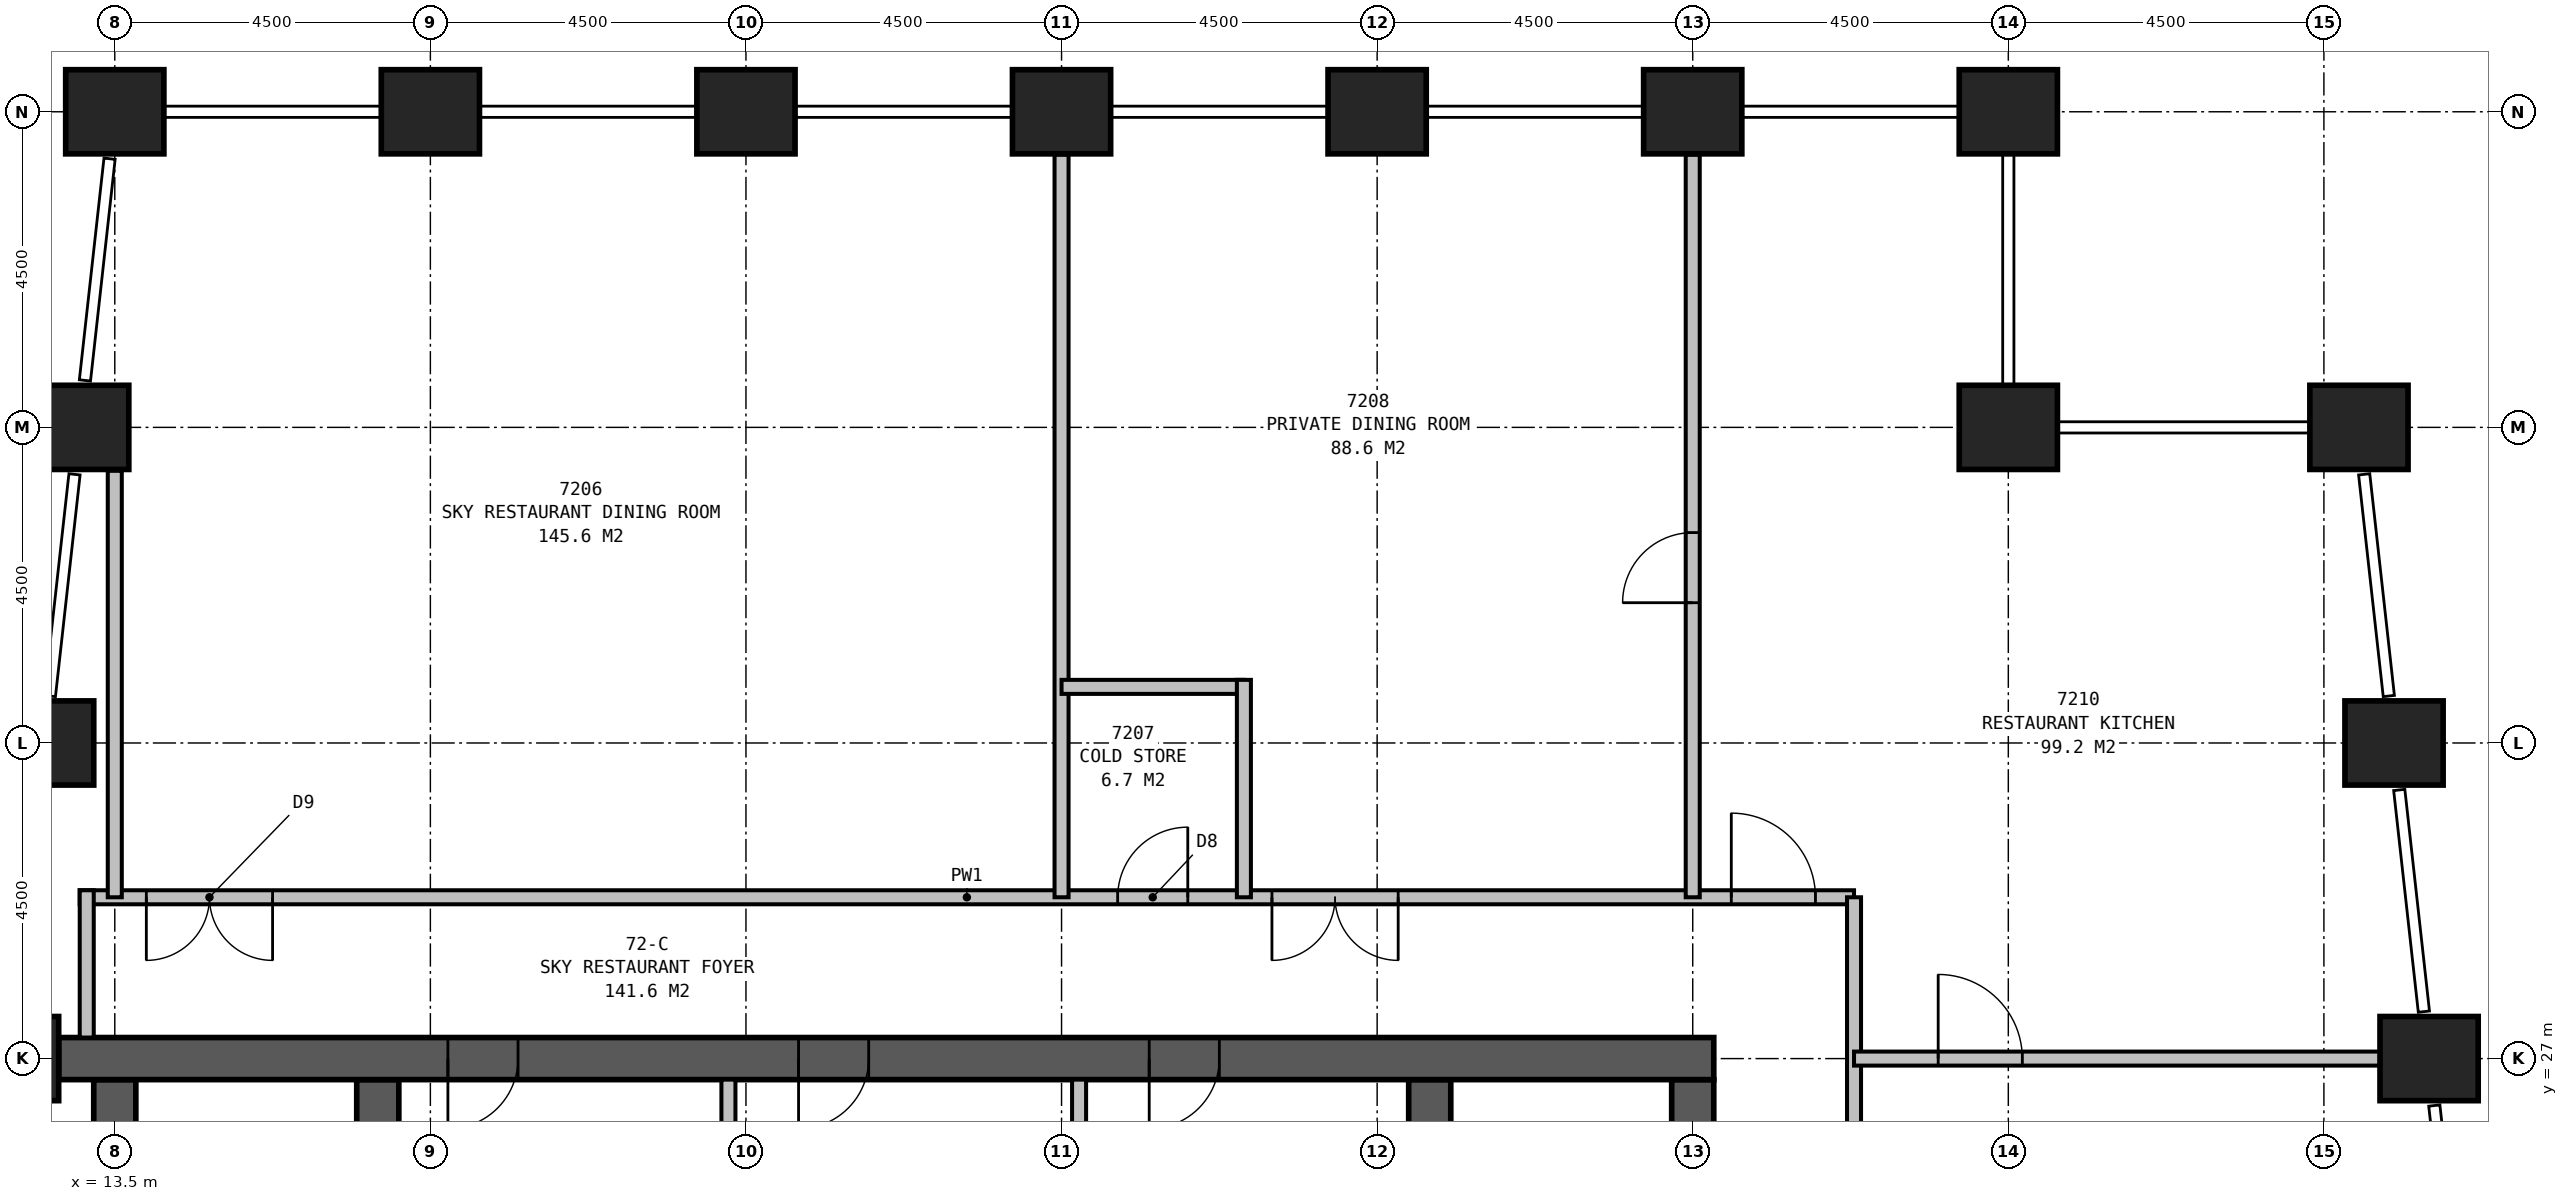
"""IFC4 building model, lengths in metres.
Left out: names, types, materials, properties, quantities, classifications, styles, units other than length and angle.
Written with IfcOpenShell. Run it as: python <this file> out.ifc"""

import sys

from ifc_helpers import new_model, si_unit, direction, frame, frame_2d, origin, origin_2d, place, context, subcontext, project, spatial, rectangle, extrude, element, fill, save


model = new_model("IFC4")
c1 = context("Model", 3, precision=1e-05, world=origin(), true_north=direction((0.0, 1.0)))
c2 = subcontext(c1, "Body", "Model", "MODEL_VIEW")
j1 = project(units=[si_unit("LENGTHUNIT", "METRE"), si_unit("PLANEANGLEUNIT", "RADIAN")], contexts=[c1])
p1 = place(None, origin())
s1 = spatial("IfcSite", under=j1, at=p1, CompositionType="ELEMENT")
p2 = place(p1, origin())
s2 = spatial("IfcBuilding", under=s1, at=p2, CompositionType="ELEMENT")
p3 = place(p2, frame((0.0, 0.0, 281.9)))
s3 = spatial("IfcBuildingStorey", under=s2, at=p3, CompositionType="ELEMENT", Elevation=281.9)
for number, where, z_axis, x_axis in (
    (1, (46.5, 27.0, 0.0), (0.0, 0.0, 1.0), (1.0, 0.0, 0.0)),
    (2, (46.0, 31.5, 0.0), (0.0, 0.0, 1.0), (1.0, 0.0, 0.0)),
    (3, (45.5, 36.0, 0.0), (0.0, 0.0, 1.0), (1.0, 0.0, 0.0)),
    (4, (40.5, 36.0, 0.0), (0.0, 0.0, 1.0), (1.0, 0.0, 0.0)),
    (5, (40.5, 40.5, 0.0), (0.0, 0.0, 1.0), (1.0, 0.0, 0.0)),
    (6, (36.0, 40.5, 0.0), (0.0, 0.0, 1.0), (1.0, 0.0, 0.0)),
    (7, (31.5, 40.5, 0.0), (0.0, 0.0, 1.0), (1.0, 0.0, 0.0)),
    (8, (27.0, 40.5, 0.0), (0.0, 0.0, 1.0), (1.0, 0.0, 0.0)),
    (9, (22.5, 40.5, 0.0), (0.0, 0.0, 1.0), (1.0, 0.0, 0.0)),
    (10, (18.0, 40.5, 0.0), (0.0, 0.0, 1.0), (1.0, 0.0, 0.0)),
    (11, (13.5, 40.5, 0.0), (0.0, 0.0, 1.0), (1.0, 0.0, 0.0)),
    (12, (13.0, 36.0, 0.0), (0.0, 0.0, 1.0), (1.0, 0.0, 0.0)),
    (13, (12.5, 31.5, 0.0), (0.0, 0.0, 1.0), (1.0, 0.0, 0.0)),
    (14, (12.0, 27.0, 0.0), (0.0, 0.0, 1.0), (1.0, 0.0, 0.0)),
):
    element("IfcColumn", number, at=place(p3, frame(where, z_axis=z_axis, x_axis=x_axis)), inside=s3, PredefinedType="COLUMN", context=c2, shape_type="SweptSolid", body=[
        extrude(rectangle(XDim=1.4, YDim=1.2, at=origin_2d()), origin(), (0.0, 0.0, 1.0), 3.9),
    ])
p4 = place(p3, frame((36.3, 27.0, 0.0), z_axis=(0.0, 0.0, 1.0), x_axis=(-1.0, 0.0, 0.0)))
e15 = element("IfcWall", 15, at=p4, inside=s3, PredefinedType="SHEAR", context=c2, shape_type="SweptSolid", body=[
    extrude(rectangle(XDim=23.6, YDim=0.6, at=frame_2d((11.8, 0.0))), origin(), (0.0, 0.0, 1.0), 3.9),
])
p5 = place(p4, frame((17.05, 0.0, 0.0)))
e16 = element("IfcOpeningElement", 16, at=p5, cuts=e15, PredefinedType="OPENING", context=c2, shape_type="SweptSolid", body=[
    extrude(rectangle(XDim=1.0, YDim=2.1, at=frame_2d((0.5, 1.05))), frame((0.0, 0.31, 0.0), z_axis=(0.0, -1.0, 0.0), x_axis=(1.0, 0.0, 0.0)), (0.0, 0.0, 1.0), 0.62),
])
p6 = place(p4, frame((12.05, 0.0, 0.0)))
e17 = element("IfcOpeningElement", 17, at=p6, cuts=e15, PredefinedType="OPENING", context=c2, shape_type="SweptSolid", body=[
    extrude(rectangle(XDim=1.0, YDim=2.1, at=frame_2d((0.5, 1.05))), frame((0.0, 0.31, 0.0), z_axis=(0.0, -1.0, 0.0), x_axis=(1.0, 0.0, 0.0)), (0.0, 0.0, 1.0), 0.62),
])
p7 = place(p4, frame((7.05, 0.0, 0.0)))
e18 = element("IfcOpeningElement", 18, at=p7, cuts=e15, PredefinedType="OPENING", context=c2, shape_type="SweptSolid", body=[
    extrude(rectangle(XDim=1.0, YDim=2.1, at=frame_2d((0.5, 1.05))), frame((0.0, 0.31, 0.0), z_axis=(0.0, -1.0, 0.0), x_axis=(1.0, 0.0, 0.0)), (0.0, 0.0, 1.0), 0.62),
])
p8 = place(p3, frame((17.25, 13.8, 0.0), z_axis=(0.0, 0.0, 1.0), x_axis=(0.0, 1.0, 0.0)))
e19 = element("IfcWall", 19, at=p8, inside=s3, PredefinedType="SHEAR", context=c2, shape_type="SweptSolid", body=[
    extrude(rectangle(XDim=12.9, YDim=0.6, at=frame_2d((6.45, 0.0))), origin(), (0.0, 0.0, 1.0), 3.9),
])
p9 = place(p8, frame((3.85, 0.0, 0.0)))
e20 = element("IfcOpeningElement", 20, at=p9, cuts=e19, PredefinedType="OPENING", context=c2, shape_type="SweptSolid", body=[
    extrude(rectangle(XDim=1.2, YDim=2.1, at=frame_2d((0.6, 1.05))), frame((0.0, 0.31, 0.0), z_axis=(0.0, -1.0, 0.0), x_axis=(1.0, 0.0, 0.0)), (0.0, 0.0, 1.0), 0.62),
])
p10 = place(p3, frame((32.25, 13.8, 0.0), z_axis=(0.0, 0.0, 1.0), x_axis=(0.0, 1.0, 0.0)))
e21 = element("IfcWall", 21, at=p10, inside=s3, PredefinedType="SHEAR", context=c2, shape_type="SweptSolid", body=[
    extrude(rectangle(XDim=12.9, YDim=0.6, at=frame_2d((6.45, 0.0))), origin(), (0.0, 0.0, 1.0), 3.9),
])
p11 = place(p10, frame((5.05, 0.0, 0.0), z_axis=(0.0, 0.0, 1.0), x_axis=(-1.0, 0.0, 0.0)))
e22 = element("IfcOpeningElement", 22, at=p11, cuts=e21, PredefinedType="OPENING", context=c2, shape_type="SweptSolid", body=[
    extrude(rectangle(XDim=1.2, YDim=2.1, at=frame_2d((0.6, 1.05))), frame((0.0, 0.31, 0.0), z_axis=(0.0, -1.0, 0.0), x_axis=(1.0, 0.0, 0.0)), (0.0, 0.0, 1.0), 0.62),
])
for number, where, z_axis, x_axis in (
    (23, (13.5, 26.7, 0.0), (0.0, 0.0, 1.0), (0.0, -1.0, 0.0)),
    (24, (36.0, 20.0, 0.0), (0.0, 0.0, 1.0), (0.0, 1.0, 0.0)),
):
    element("IfcWall", number, at=place(p3, frame(where, z_axis=z_axis, x_axis=x_axis)), inside=s3, PredefinedType="SHEAR", context=c2, shape_type="SweptSolid", body=[
        extrude(rectangle(XDim=6.7, YDim=0.6, at=frame_2d((3.35, 0.0))), origin(), (0.0, 0.0, 1.0), 3.9),
    ])
p12 = place(p3, frame((38.3, 11.2, 0.0), z_axis=(0.0, 0.0, 1.0), x_axis=(0.0, 1.0, 0.0)))
e25 = element("IfcWall", 25, at=p12, inside=s3, PredefinedType="PARTITIONING", context=c2, shape_type="SweptSolid", body=[
    extrude(rectangle(XDim=18.1, YDim=0.2, at=frame_2d((9.05, 0.0))), origin(), (0.0, 0.0, 1.0), 3.65),
])
p13 = place(p12, frame((4.0, 0.0, 0.0), z_axis=(0.0, 0.0, 1.0), x_axis=(-1.0, 0.0, 0.0)))
e26 = element("IfcOpeningElement", 26, at=p13, cuts=e25, PredefinedType="OPENING", context=c2, shape_type="SweptSolid", body=[
    extrude(rectangle(XDim=1.0, YDim=2.1, at=frame_2d((0.5, 1.05))), frame((0.0, 0.11, 0.0), z_axis=(0.0, -1.0, 0.0), x_axis=(1.0, 0.0, 0.0)), (0.0, 0.0, 1.0), 0.22),
])
p14 = place(p12, frame((6.8, 0.0, 0.0), z_axis=(0.0, 0.0, 1.0), x_axis=(-1.0, 0.0, 0.0)))
e27 = element("IfcOpeningElement", 27, at=p14, cuts=e25, PredefinedType="OPENING", context=c2, shape_type="SweptSolid", body=[
    extrude(rectangle(XDim=1.0, YDim=2.1, at=frame_2d((0.5, 1.05))), frame((0.0, 0.11, 0.0), z_axis=(0.0, -1.0, 0.0), x_axis=(1.0, 0.0, 0.0)), (0.0, 0.0, 1.0), 0.22),
])
p15 = place(p12, frame((10.1, 0.0, 0.0), z_axis=(0.0, 0.0, 1.0), x_axis=(-1.0, 0.0, 0.0)))
e28 = element("IfcOpeningElement", 28, at=p15, cuts=e25, PredefinedType="OPENING", context=c2, shape_type="SweptSolid", body=[
    extrude(rectangle(XDim=1.0, YDim=2.1, at=frame_2d((0.5, 1.05))), frame((0.0, 0.11, 0.0), z_axis=(0.0, -1.0, 0.0), x_axis=(1.0, 0.0, 0.0)), (0.0, 0.0, 1.0), 0.22),
])
p16 = place(p12, frame((13.55, 0.0, 0.0), z_axis=(0.0, 0.0, 1.0), x_axis=(-1.0, 0.0, 0.0)))
e29 = element("IfcOpeningElement", 29, at=p16, cuts=e25, PredefinedType="OPENING", context=c2, shape_type="SweptSolid", body=[
    extrude(rectangle(XDim=1.8, YDim=2.4, at=frame_2d((0.9, 1.2))), frame((0.0, 0.11, 0.0), z_axis=(0.0, -1.0, 0.0), x_axis=(1.0, 0.0, 0.0)), (0.0, 0.0, 1.0), 0.22),
])
p17 = place(p3, frame((13.0, 29.3, 0.0), z_axis=(0.0, 0.0, 1.0), x_axis=(1.0, 0.0, 0.0)))
e30 = element("IfcWall", 30, at=p17, inside=s3, PredefinedType="PARTITIONING", context=c2, shape_type="SweptSolid", body=[
    extrude(rectangle(XDim=25.3, YDim=0.2, at=frame_2d((12.65, 0.0))), origin(), (0.0, 0.0, 1.0), 3.65),
])
p18 = place(p17, frame((2.75, 0.0, 0.0), z_axis=(0.0, 0.0, 1.0), x_axis=(-1.0, 0.0, 0.0)))
e31 = element("IfcOpeningElement", 31, at=p18, cuts=e30, PredefinedType="OPENING", context=c2, shape_type="SweptSolid", body=[
    extrude(rectangle(XDim=1.8, YDim=2.4, at=frame_2d((0.9, 1.2))), frame((0.0, 0.11, 0.0), z_axis=(0.0, -1.0, 0.0), x_axis=(1.0, 0.0, 0.0)), (0.0, 0.0, 1.0), 0.22),
])
p19 = place(p17, frame((14.8, 0.0, 0.0)))
e32 = element("IfcOpeningElement", 32, at=p19, cuts=e30, PredefinedType="OPENING", context=c2, shape_type="SweptSolid", body=[
    extrude(rectangle(XDim=1.0, YDim=2.1, at=frame_2d((0.5, 1.05))), frame((0.0, 0.11, 0.0), z_axis=(0.0, -1.0, 0.0), x_axis=(1.0, 0.0, 0.0)), (0.0, 0.0, 1.0), 0.22),
])
p20 = place(p17, frame((18.8, 0.0, 0.0), z_axis=(0.0, 0.0, 1.0), x_axis=(-1.0, 0.0, 0.0)))
e33 = element("IfcOpeningElement", 33, at=p20, cuts=e30, PredefinedType="OPENING", context=c2, shape_type="SweptSolid", body=[
    extrude(rectangle(XDim=1.8, YDim=2.4, at=frame_2d((0.9, 1.2))), frame((0.0, 0.11, 0.0), z_axis=(0.0, -1.0, 0.0), x_axis=(1.0, 0.0, 0.0)), (0.0, 0.0, 1.0), 0.22),
])
p21 = place(p17, frame((23.55, 0.0, 0.0)))
e34 = element("IfcOpeningElement", 34, at=p21, cuts=e30, PredefinedType="OPENING", context=c2, shape_type="SweptSolid", body=[
    extrude(rectangle(XDim=1.2, YDim=2.1, at=frame_2d((0.6, 1.05))), frame((0.0, 0.11, 0.0), z_axis=(0.0, -1.0, 0.0), x_axis=(1.0, 0.0, 0.0)), (0.0, 0.0, 1.0), 0.22),
])
p22 = place(p3, frame((38.3, 27.0, 0.0), z_axis=(0.0, 0.0, 1.0), x_axis=(1.0, 0.0, 0.0)))
e35 = element("IfcWall", 35, at=p22, inside=s3, PredefinedType="PARTITIONING", context=c2, shape_type="SweptSolid", body=[
    extrude(rectangle(XDim=7.499, YDim=0.2, at=frame_2d((3.75, 0.0))), origin(), (0.0, 0.0, 1.0), 2.35),
])
p23 = place(p22, frame((1.2, 0.0, 0.0)))
e36 = element("IfcOpeningElement", 36, at=p23, cuts=e35, PredefinedType="OPENING", context=c2, shape_type="SweptSolid", body=[
    extrude(rectangle(XDim=1.2, YDim=2.1, at=frame_2d((0.6, 1.05))), frame((0.0, 0.11, 0.0), z_axis=(0.0, -1.0, 0.0), x_axis=(1.0, 0.0, 0.0)), (0.0, 0.0, 1.0), 0.22),
])
p24 = place(p3, frame((13.5, 29.3, 0.0), z_axis=(0.0, 0.0, 1.0), x_axis=(0.0, 1.0, 0.0)))
e37 = element("IfcWall", 37, at=p24, inside=s3, PredefinedType="PARTITIONING", context=c2, shape_type="SweptSolid", body=[
    extrude(rectangle(XDim=6.082, YDim=0.2, at=frame_2d((3.041, 0.0))), origin(), (0.0, 0.0, 1.0), 2.65),
])
p25 = place(p3, frame((27.0, 29.3, 0.0), z_axis=(0.0, 0.0, 1.0), x_axis=(0.0, 1.0, 0.0)))
e38 = element("IfcWall", 38, at=p25, inside=s3, PredefinedType="PARTITIONING", context=c2, shape_type="SweptSolid", body=[
    extrude(rectangle(XDim=10.59, YDim=0.2, at=frame_2d((5.295, 0.0))), origin(), (0.0, 0.0, 1.0), 2.65),
])
p26 = place(p3, frame((36.0, 29.3, 0.0), z_axis=(0.0, 0.0, 1.0), x_axis=(0.0, 1.0, 0.0)))
e39 = element("IfcWall", 39, at=p26, inside=s3, PredefinedType="PARTITIONING", context=c2, shape_type="SweptSolid", body=[
    extrude(rectangle(XDim=10.59, YDim=0.2, at=frame_2d((5.295, 0.0))), origin(), (0.0, 0.0, 1.0), 2.65),
])
p27 = place(p26, frame((4.2, 0.0, 0.0)))
e40 = element("IfcOpeningElement", 40, at=p27, cuts=e39, PredefinedType="OPENING", context=c2, shape_type="SweptSolid", body=[
    extrude(rectangle(XDim=1.0, YDim=2.1, at=frame_2d((0.5, 1.05))), frame((0.0, 0.11, 0.0), z_axis=(0.0, -1.0, 0.0), x_axis=(1.0, 0.0, 0.0)), (0.0, 0.0, 1.0), 0.22),
])
p28 = place(p3, frame((29.6, 29.3, 0.0), z_axis=(0.0, 0.0, 1.0), x_axis=(0.0, 1.0, 0.0)))
e41 = element("IfcWall", 41, at=p28, inside=s3, PredefinedType="PARTITIONING", context=c2, shape_type="SweptSolid", body=[
    extrude(rectangle(XDim=3.1, YDim=0.2, at=frame_2d((1.55, 0.0))), origin(), (0.0, 0.0, 1.0), 3.65),
])
p29 = place(p3, frame((27.0, 32.3, 0.0), z_axis=(0.0, 0.0, 1.0), x_axis=(1.0, 0.0, 0.0)))
e42 = element("IfcWall", 42, at=p29, inside=s3, PredefinedType="PARTITIONING", context=c2, shape_type="SweptSolid", body=[
    extrude(rectangle(XDim=2.6, YDim=0.2, at=frame_2d((1.3, 0.0))), origin(), (0.0, 0.0, 1.0), 3.65),
])
p30 = place(p3, frame((13.1, 27.3, 0.0), z_axis=(0.0, 0.0, 1.0), x_axis=(0.0, 1.0, 0.0)))
e43 = element("IfcWall", 43, at=p30, inside=s3, PredefinedType="PARTITIONING", context=c2, shape_type="SweptSolid", body=[
    extrude(rectangle(XDim=2.1, YDim=0.2, at=frame_2d((1.05, 0.0))), origin(), (0.0, 0.0, 1.0), 3.65),
])
for number, where, z_axis, x_axis in (
    (44, (22.25, 23.6, 0.0), (0.0, 0.0, 1.0), (0.0, 1.0, 0.0)),
    (45, (27.25, 23.6, 0.0), (0.0, 0.0, 1.0), (0.0, 1.0, 0.0)),
):
    element("IfcWall", number, at=place(p3, frame(where, z_axis=z_axis, x_axis=x_axis)), inside=s3, PredefinedType="PARTITIONING", context=c2, shape_type="SweptSolid", body=[
        extrude(rectangle(XDim=3.1, YDim=0.2, at=frame_2d((1.55, 0.0))), origin(), (0.0, 0.0, 1.0), 3.65),
    ])
p31 = place(p18, origin())
e46 = element("IfcDoor", 46, at=p31, inside=s3, OperationType="DOUBLE_DOOR_SINGLE_SWING", PredefinedType="DOOR", context=c2, shape_type="SweptSolid", body=[
    extrude(rectangle(XDim=1.8, YDim=2.4, at=frame_2d((0.9, 1.2))), frame((0.0, 0.025, 0.0), z_axis=(0.0, -1.0, 0.0), x_axis=(1.0, 0.0, 0.0)), (0.0, 0.0, 1.0), 0.05),
])
fill(e31, e46)
p32 = place(p19, origin())
e47 = element("IfcDoor", 47, at=p32, inside=s3, OperationType="SINGLE_SWING_RIGHT", PredefinedType="DOOR", context=c2, shape_type="SweptSolid", body=[
    extrude(rectangle(XDim=1.0, YDim=2.1, at=frame_2d((0.5, 1.05))), frame((0.0, 0.025, 0.0), z_axis=(0.0, -1.0, 0.0), x_axis=(1.0, 0.0, 0.0)), (0.0, 0.0, 1.0), 0.05),
])
fill(e32, e47)
p33 = place(p20, origin())
e48 = element("IfcDoor", 48, at=p33, inside=s3, OperationType="DOUBLE_DOOR_SINGLE_SWING", PredefinedType="DOOR", context=c2, shape_type="SweptSolid", body=[
    extrude(rectangle(XDim=1.8, YDim=2.4, at=frame_2d((0.9, 1.2))), frame((0.0, 0.025, 0.0), z_axis=(0.0, -1.0, 0.0), x_axis=(1.0, 0.0, 0.0)), (0.0, 0.0, 1.0), 0.05),
])
fill(e33, e48)
p34 = place(p21, origin())
e49 = element("IfcDoor", 49, at=p34, inside=s3, OperationType="SINGLE_SWING_LEFT", PredefinedType="DOOR", context=c2, shape_type="SweptSolid", body=[
    extrude(rectangle(XDim=1.2, YDim=2.1, at=frame_2d((0.6, 1.05))), frame((0.0, 0.025, 0.0), z_axis=(0.0, -1.0, 0.0), x_axis=(1.0, 0.0, 0.0)), (0.0, 0.0, 1.0), 0.05),
])
fill(e34, e49)
p35 = place(p23, origin())
e50 = element("IfcDoor", 50, at=p35, inside=s3, OperationType="SINGLE_SWING_LEFT", PredefinedType="DOOR", context=c2, shape_type="SweptSolid", body=[
    extrude(rectangle(XDim=1.2, YDim=2.1, at=frame_2d((0.6, 1.05))), frame((0.0, 0.025, 0.0), z_axis=(0.0, -1.0, 0.0), x_axis=(1.0, 0.0, 0.0)), (0.0, 0.0, 1.0), 0.05),
])
fill(e36, e50)
p36 = place(p27, origin())
e51 = element("IfcDoor", 51, at=p36, inside=s3, OperationType="SINGLE_SWING_LEFT", PredefinedType="DOOR", context=c2, shape_type="SweptSolid", body=[
    extrude(rectangle(XDim=1.0, YDim=2.1, at=frame_2d((0.5, 1.05))), frame((0.0, 0.025, 0.0), z_axis=(0.0, -1.0, 0.0), x_axis=(1.0, 0.0, 0.0)), (0.0, 0.0, 1.0), 0.05),
])
fill(e40, e51)
p37 = place(p5, origin())
e52 = element("IfcDoor", 52, at=p37, inside=s3, OperationType="SINGLE_SWING_RIGHT", PredefinedType="DOOR", context=c2, shape_type="SweptSolid", body=[
    extrude(rectangle(XDim=1.0, YDim=2.1, at=frame_2d((0.5, 1.05))), frame((0.0, 0.3, 0.0), z_axis=(0.0, -1.0, 0.0), x_axis=(1.0, 0.0, 0.0)), (0.0, 0.0, 1.0), 0.6),
])
fill(e16, e52)
p38 = place(p6, origin())
e53 = element("IfcDoor", 53, at=p38, inside=s3, OperationType="SINGLE_SWING_RIGHT", PredefinedType="DOOR", context=c2, shape_type="SweptSolid", body=[
    extrude(rectangle(XDim=1.0, YDim=2.1, at=frame_2d((0.5, 1.05))), frame((0.0, 0.3, 0.0), z_axis=(0.0, -1.0, 0.0), x_axis=(1.0, 0.0, 0.0)), (0.0, 0.0, 1.0), 0.6),
])
fill(e17, e53)
p39 = place(p7, origin())
e54 = element("IfcDoor", 54, at=p39, inside=s3, OperationType="SINGLE_SWING_RIGHT", PredefinedType="DOOR", context=c2, shape_type="SweptSolid", body=[
    extrude(rectangle(XDim=1.0, YDim=2.1, at=frame_2d((0.5, 1.05))), frame((0.0, 0.3, 0.0), z_axis=(0.0, -1.0, 0.0), x_axis=(1.0, 0.0, 0.0)), (0.0, 0.0, 1.0), 0.6),
])
fill(e18, e54)
save(model, sys.argv[1])
